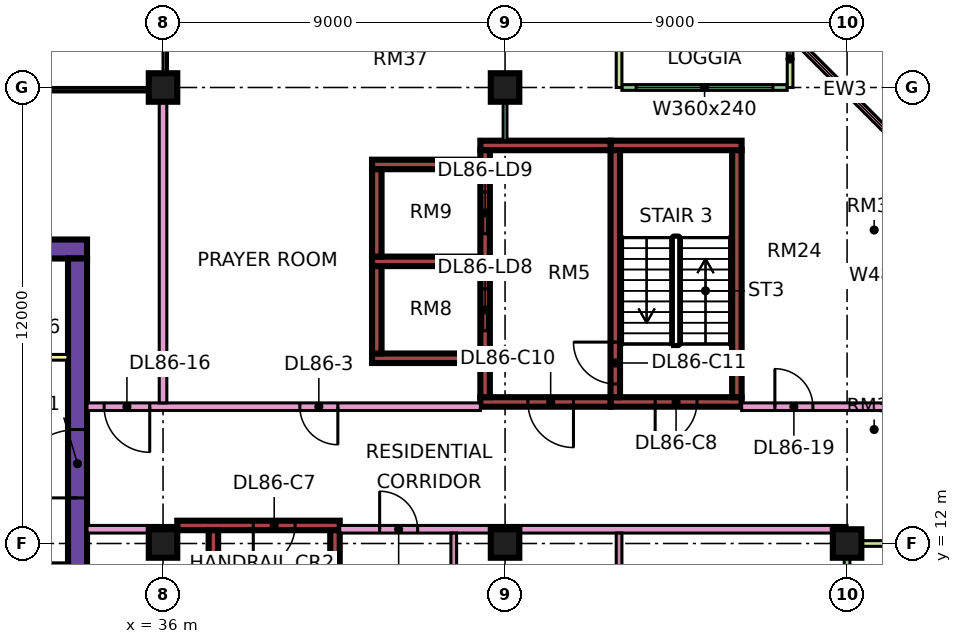
"""IFC4 building model, lengths in metres.
Left out: names, types, materials, properties, quantities, classifications, styles, units other than length and angle.
Written with IfcOpenShell. Run it as: python <this file> out.ifc"""

import sys

from ifc_helpers import new_model, si_unit, direction, frame, frame_2d, origin, origin_2d, place, context, subcontext, project, spatial, rectangle, extrude, element, fill, save


model = new_model("IFC4")
c1 = context("Model", 3, precision=1e-05, world=origin(), true_north=direction((0.0, 1.0)))
c2 = subcontext(c1, "Body", "Model", "MODEL_VIEW")
j1 = project(units=[si_unit("LENGTHUNIT", "METRE"), si_unit("PLANEANGLEUNIT", "RADIAN")], contexts=[c1])
p1 = place(None, origin())
s1 = spatial("IfcSite", under=j1, at=p1, CompositionType="ELEMENT")
p2 = place(p1, origin())
s2 = spatial("IfcBuilding", under=s1, at=p2, CompositionType="ELEMENT")
p3 = place(p2, frame((0.0, 0.0, 368.9)))
s3 = spatial("IfcBuildingStorey", under=s2, at=p3, CompositionType="ELEMENT", Elevation=368.9)
for number, where, z_axis, x_axis in (
    (1, (36.0, 12.0, 0.0), (0.0, 0.0, 1.0), (1.0, 0.0, 0.0)),
    (2, (36.0, 24.0, 0.0), (0.0, 0.0, 1.0), (1.0, 0.0, 0.0)),
    (3, (45.0, 12.0, 0.0), (0.0, 0.0, 1.0), (1.0, 0.0, 0.0)),
    (4, (45.0, 24.0, 0.0), (0.0, 0.0, 1.0), (1.0, 0.0, 0.0)),
    (5, (54.0, 12.0, 0.0), (0.0, 0.0, 1.0), (1.0, 0.0, 0.0)),
):
    element("IfcColumn", number, at=place(p3, frame(where, z_axis=z_axis, x_axis=x_axis)), inside=s3, PredefinedType="COLUMN", context=c2, shape_type="SweptSolid", body=[
        extrude(rectangle(XDim=0.75, YDim=0.75, at=origin_2d()), origin(), (0.0, 0.0, 1.0), 3.75),
    ])
p4 = place(p3, frame((9.0, 19.75, 0.0), z_axis=(0.0, 0.0, 1.0), x_axis=(1.0, 0.0, 0.0)))
e6 = element("IfcWall", 6, at=p4, inside=s3, PredefinedType="SHEAR", context=c2, shape_type="SweptSolid", body=[
    extrude(rectangle(XDim=25.0, YDim=0.5, at=frame_2d((12.5, 0.0))), origin(), (0.0, 0.0, 1.0), 3.75),
])
p5 = place(p4, frame((19.1, 0.0, 0.0)))
e7 = element("IfcOpeningElement", 7, at=p5, cuts=e6, PredefinedType="OPENING", context=c2, shape_type="SweptSolid", body=[
    extrude(rectangle(XDim=1.8, YDim=2.4, at=frame_2d((0.9, 1.2))), frame((0.0, 0.26, 0.0), z_axis=(0.0, -1.0, 0.0), x_axis=(1.0, 0.0, 0.0)), (0.0, 0.0, 1.0), 0.52),
])
p6 = place(p3, frame((33.75, 7.5, 0.0), z_axis=(0.0, 0.0, 1.0), x_axis=(0.0, 1.0, 0.0)))
e8 = element("IfcWall", 8, at=p6, inside=s3, PredefinedType="SHEAR", context=c2, shape_type="SweptSolid", body=[
    extrude(rectangle(XDim=12.0, YDim=0.5, at=frame_2d((6.0, 0.0))), origin(), (0.0, 0.0, 1.0), 3.75),
])
p7 = place(p6, frame((5.7, 0.0, 0.0)))
e9 = element("IfcOpeningElement", 9, at=p7, cuts=e8, PredefinedType="OPENING", context=c2, shape_type="SweptSolid", body=[
    extrude(rectangle(XDim=1.8, YDim=2.4, at=frame_2d((0.9, 1.2))), frame((0.0, 0.26, 0.0), z_axis=(0.0, -1.0, 0.0), x_axis=(1.0, 0.0, 0.0)), (0.0, 0.0, 1.0), 0.52),
])
p8 = place(p3, frame((36.375, 12.475, 0.0), z_axis=(0.0, 0.0, 1.0), x_axis=(1.0, 0.0, 0.0)))
e10 = element("IfcWall", 10, at=p8, inside=s3, PredefinedType="SHEAR", context=c2, shape_type="SweptSolid", body=[
    extrude(rectangle(XDim=4.275, YDim=0.25, at=frame_2d((2.137, 0.0))), origin(), (0.0, 0.0, 1.0), 3.75),
])
p9 = place(p8, frame((2.0, 0.0, 0.0)))
e11 = element("IfcOpeningElement", 11, at=p9, cuts=e10, PredefinedType="OPENING", context=c2, shape_type="SweptSolid", body=[
    extrude(rectangle(XDim=1.1, YDim=2.2, at=frame_2d((0.55, 1.1))), frame((0.0, 0.135, 0.0), z_axis=(0.0, -1.0, 0.0), x_axis=(1.0, 0.0, 0.0)), (0.0, 0.0, 1.0), 0.27),
])
for number, where, z_axis, x_axis in (
    (12, (37.325, 5.85, 0.0), (0.0, 0.0, 1.0), (0.0, 1.0, 0.0)),
    (13, (40.525, 5.85, 0.0), (0.0, 0.0, 1.0), (0.0, 1.0, 0.0)),
):
    element("IfcWall", number, at=place(p3, frame(where, z_axis=z_axis, x_axis=x_axis)), inside=s3, PredefinedType="SHEAR", context=c2, shape_type="SweptSolid", body=[
        extrude(rectangle(XDim=6.5, YDim=0.25, at=frame_2d((3.25, 0.0))), origin(), (0.0, 0.0, 1.0), 3.75),
    ])
p10 = place(p3, frame((47.775, 15.725, 0.0), z_axis=(0.0, 0.0, 1.0), x_axis=(1.0, 0.0, 0.0)))
e14 = element("IfcWall", 14, at=p10, inside=s3, PredefinedType="SHEAR", context=c2, shape_type="SweptSolid", body=[
    extrude(rectangle(XDim=3.45, YDim=0.25, at=frame_2d((1.725, 0.0))), origin(), (0.0, 0.0, 1.0), 3.75),
])
p11 = place(p10, frame((1.175, 0.0, 0.0)))
e15 = element("IfcOpeningElement", 15, at=p11, cuts=e14, PredefinedType="OPENING", context=c2, shape_type="SweptSolid", body=[
    extrude(rectangle(XDim=1.1, YDim=2.2, at=frame_2d((0.55, 1.1))), frame((0.0, 0.135, 0.0), z_axis=(0.0, -1.0, 0.0), x_axis=(1.0, 0.0, 0.0)), (0.0, 0.0, 1.0), 0.27),
])
p12 = place(p3, frame((47.775, 22.475, 0.0), z_axis=(0.0, 0.0, 1.0), x_axis=(1.0, 0.0, 0.0)))
e16 = element("IfcWall", 16, at=p12, inside=s3, PredefinedType="SHEAR", context=c2, shape_type="SweptSolid", body=[
    extrude(rectangle(XDim=3.45, YDim=0.25, at=frame_2d((1.725, 0.0))), origin(), (0.0, 0.0, 1.0), 3.75),
])
p13 = place(p3, frame((47.9, 15.85, 0.0), z_axis=(0.0, 0.0, 1.0), x_axis=(0.0, 1.0, 0.0)))
e17 = element("IfcWall", 17, at=p13, inside=s3, PredefinedType="SHEAR", context=c2, shape_type="SweptSolid", body=[
    extrude(rectangle(XDim=6.5, YDim=0.25, at=frame_2d((3.25, 0.0))), origin(), (0.0, 0.0, 1.0), 3.75),
])
p14 = place(p13, frame((0.35, 0.0, 0.0)))
e18 = element("IfcOpeningElement", 18, at=p14, cuts=e17, PredefinedType="OPENING", context=c2, shape_type="SweptSolid", body=[
    extrude(rectangle(XDim=1.1, YDim=2.2, at=frame_2d((0.55, 1.1))), frame((0.0, 0.135, 0.0), z_axis=(0.0, -1.0, 0.0), x_axis=(1.0, 0.0, 0.0)), (0.0, 0.0, 1.0), 0.27),
])
p15 = place(p3, frame((51.1, 15.85, 0.0), z_axis=(0.0, 0.0, 1.0), x_axis=(0.0, 1.0, 0.0)))
e19 = element("IfcWall", 19, at=p15, inside=s3, PredefinedType="SHEAR", context=c2, shape_type="SweptSolid", body=[
    extrude(rectangle(XDim=6.5, YDim=0.25, at=frame_2d((3.25, 0.0))), origin(), (0.0, 0.0, 1.0), 3.75),
])
p16 = place(p3, frame((44.35, 15.725, 0.0), z_axis=(0.0, 0.0, 1.0), x_axis=(1.0, 0.0, 0.0)))
e20 = element("IfcWall", 20, at=p16, inside=s3, PredefinedType="SHEAR", context=c2, shape_type="SweptSolid", body=[
    extrude(rectangle(XDim=3.425, YDim=0.25, at=frame_2d((1.712, 0.0))), origin(), (0.0, 0.0, 1.0), 3.75),
])
p17 = place(p16, frame((1.25, 0.0, 0.0)))
e21 = element("IfcOpeningElement", 21, at=p17, cuts=e20, PredefinedType="OPENING", context=c2, shape_type="SweptSolid", body=[
    extrude(rectangle(XDim=1.2, YDim=2.2, at=frame_2d((0.6, 1.1))), frame((0.0, 0.135, 0.0), z_axis=(0.0, -1.0, 0.0), x_axis=(1.0, 0.0, 0.0)), (0.0, 0.0, 1.0), 0.27),
])
p18 = place(p3, frame((44.35, 22.475, 0.0), z_axis=(0.0, 0.0, 1.0), x_axis=(1.0, 0.0, 0.0)))
e22 = element("IfcWall", 22, at=p18, inside=s3, PredefinedType="SHEAR", context=c2, shape_type="SweptSolid", body=[
    extrude(rectangle(XDim=3.425, YDim=0.25, at=frame_2d((1.712, 0.0))), origin(), (0.0, 0.0, 1.0), 3.75),
])
p19 = place(p3, frame((44.475, 15.85, 0.0), z_axis=(0.0, 0.0, 1.0), x_axis=(0.0, 1.0, 0.0)))
e23 = element("IfcWall", 23, at=p19, inside=s3, PredefinedType="SHEAR", context=c2, shape_type="SweptSolid", body=[
    extrude(rectangle(XDim=6.5, YDim=0.25, at=frame_2d((3.25, 0.0))), origin(), (0.0, 0.0, 1.0), 3.75),
])
p20 = place(p19, frame((1.75, 0.0, 0.0)))
e24 = element("IfcOpeningElement", 24, at=p20, cuts=e23, PredefinedType="OPENING", context=c2, shape_type="SweptSolid", body=[
    extrude(rectangle(XDim=1.1, YDim=2.2, at=frame_2d((0.55, 1.1))), frame((0.0, 0.135, 0.0), z_axis=(0.0, -1.0, 0.0), x_axis=(1.0, 0.0, 0.0)), (0.0, 0.0, 1.0), 0.27),
])
p21 = place(p19, frame((4.3, 0.0, 0.0)))
e25 = element("IfcOpeningElement", 25, at=p21, cuts=e23, PredefinedType="OPENING", context=c2, shape_type="SweptSolid", body=[
    extrude(rectangle(XDim=1.1, YDim=2.2, at=frame_2d((0.55, 1.1))), frame((0.0, 0.135, 0.0), z_axis=(0.0, -1.0, 0.0), x_axis=(1.0, 0.0, 0.0)), (0.0, 0.0, 1.0), 0.27),
])
for number, where, z_axis, x_axis in (
    (26, (41.5, 16.875, 0.0), (0.0, 0.0, 1.0), (1.0, 0.0, 0.0)),
    (27, (41.5, 19.425, 0.0), (0.0, 0.0, 1.0), (1.0, 0.0, 0.0)),
    (28, (41.5, 21.975, 0.0), (0.0, 0.0, 1.0), (1.0, 0.0, 0.0)),
):
    element("IfcWall", number, at=place(p3, frame(where, z_axis=z_axis, x_axis=x_axis)), inside=s3, PredefinedType="SHEAR", context=c2, shape_type="SweptSolid", body=[
        extrude(rectangle(XDim=2.85, YDim=0.25, at=frame_2d((1.425, 0.0))), origin(), (0.0, 0.0, 1.0), 3.75),
    ])
for number, where, z_axis, x_axis in (
    (29, (41.625, 17.0, 0.0), (0.0, 0.0, 1.0), (0.0, 1.0, 0.0)),
    (30, (41.625, 19.55, 0.0), (0.0, 0.0, 1.0), (0.0, 1.0, 0.0)),
):
    element("IfcWall", number, at=place(p3, frame(where, z_axis=z_axis, x_axis=x_axis)), inside=s3, PredefinedType="SHEAR", context=c2, shape_type="SweptSolid", body=[
        extrude(rectangle(XDim=2.3, YDim=0.25, at=frame_2d((1.15, 0.0))), origin(), (0.0, 0.0, 1.0), 3.75),
    ])
p22 = place(p3, frame((52.425, 24.0, 0.0), z_axis=(0.0, 0.0, 1.0), x_axis=(-1.0, 0.0, 0.0)))
e31 = element("IfcWall", 31, at=p22, inside=s3, PredefinedType="SOLIDWALL", context=c2, shape_type="SweptSolid", body=[
    extrude(rectangle(XDim=4.35, YDim=0.15, at=frame_2d((2.175, 0.0))), origin(), (0.0, 0.0, 1.0), 3.35),
])
p23 = place(p22, frame((0.375, 0.0, 0.45)))
e32 = element("IfcOpeningElement", 32, at=p23, cuts=e31, PredefinedType="OPENING", context=c2, shape_type="SweptSolid", body=[
    extrude(rectangle(XDim=3.6, YDim=2.4, at=frame_2d((1.8, 1.2))), frame((0.0, 0.085, 0.0), z_axis=(0.0, -1.0, 0.0), x_axis=(1.0, 0.0, 0.0)), (0.0, 0.0, 1.0), 0.17),
])
for number, where, z_axis, x_axis in (
    (33, (52.5, 25.5, 0.0), (0.0, 0.0, 1.0), (0.0, -1.0, 0.0)),
    (34, (48.0, 25.5, 0.0), (0.0, 0.0, 1.0), (0.0, -1.0, 0.0)),
):
    element("IfcWall", number, at=place(p3, frame(where, z_axis=z_axis, x_axis=x_axis)), inside=s3, PredefinedType="SOLIDWALL", context=c2, shape_type="SweptSolid", body=[
        extrude(rectangle(XDim=1.5, YDim=0.15, at=frame_2d((0.75, 0.0))), origin(), (0.0, 0.0, 1.0), 3.35),
    ])
p24 = place(p3, frame((54.0, 1.575, 0.0), z_axis=(0.0, 0.0, 1.0), x_axis=(0.0, 1.0, 0.0)))
e35 = element("IfcWall", 35, at=p24, inside=s3, PredefinedType="SOLIDWALL", context=c2, shape_type="SweptSolid", body=[
    extrude(rectangle(XDim=10.35, YDim=0.15, at=frame_2d((5.175, 0.0))), origin(), (0.0, 0.0, 1.0), 3.35),
])
p25 = place(p24, frame((0.663, 0.0, 0.0)))
e36 = element("IfcOpeningElement", 36, at=p25, cuts=e35, PredefinedType="OPENING", context=c2, shape_type="SweptSolid", body=[
    extrude(rectangle(XDim=1.8, YDim=2.4, at=frame_2d((0.9, 1.2))), frame((0.0, 0.085, 0.0), z_axis=(0.0, -1.0, 0.0), x_axis=(1.0, 0.0, 0.0)), (0.0, 0.0, 1.0), 0.17),
])
p26 = place(p24, frame((5.637, 0.0, 0.45)))
e37 = element("IfcOpeningElement", 37, at=p26, cuts=e35, PredefinedType="OPENING", context=c2, shape_type="SweptSolid", body=[
    extrude(rectangle(XDim=3.0, YDim=2.4, at=frame_2d((1.5, 1.2))), frame((0.0, 0.085, 0.0), z_axis=(0.0, -1.0, 0.0), x_axis=(1.0, 0.0, 0.0)), (0.0, 0.0, 1.0), 0.17),
])
p27 = place(p3, frame((55.5, 12.0, 0.0), z_axis=(0.0, 0.0, 1.0), x_axis=(-1.0, 0.0, 0.0)))
e38 = element("IfcWall", 38, at=p27, inside=s3, PredefinedType="SOLIDWALL", context=c2, shape_type="SweptSolid", body=[
    extrude(rectangle(XDim=1.5, YDim=0.15, at=frame_2d((0.75, 0.0))), origin(), (0.0, 0.0, 1.0), 3.35),
])
p28 = place(p3, frame((55.447, 22.447, 0.0), z_axis=(0.0, 0.0, 1.0), x_axis=(-0.707106781187, 0.707106781187, 0.0)))
e39 = element("IfcWall", 39, at=p28, inside=s3, PredefinedType="SOLIDWALL", context=c2, shape_type="SweptSolid", body=[
    extrude(rectangle(XDim=4.243, YDim=0.15, at=frame_2d((2.121, 0.0))), origin(), (0.0, 0.0, 1.0), 3.35),
])
p29 = place(p28, frame((0.621, 0.0, 0.45)))
e40 = element("IfcOpeningElement", 40, at=p29, cuts=e39, PredefinedType="OPENING", context=c2, shape_type="SweptSolid", body=[
    extrude(rectangle(XDim=3.0, YDim=2.4, at=frame_2d((1.5, 1.2))), frame((0.0, 0.085, 0.0), z_axis=(0.0, -1.0, 0.0), x_axis=(1.0, 0.0, 0.0)), (0.0, 0.0, 1.0), 0.17),
])
p30 = place(p3, frame((31.1, 16.9, 0.0), z_axis=(0.0, 0.0, 1.0), x_axis=(1.0, 0.0, 0.0)))
e41 = element("IfcWall", 41, at=p30, inside=s3, PredefinedType="PARTITIONING", context=c2, shape_type="SweptSolid", body=[
    extrude(rectangle(XDim=2.4, YDim=0.15, at=frame_2d((1.2, 0.0))), origin(), (0.0, 0.0, 1.0), 3.35),
])
p31 = place(p3, frame((34.0, 12.375, 0.0), z_axis=(0.0, 0.0, 1.0), x_axis=(1.0, 0.0, 0.0)))
e42 = element("IfcWall", 42, at=p31, inside=s3, PredefinedType="PARTITIONING", context=c2, shape_type="SweptSolid", body=[
    extrude(rectangle(XDim=2.376, YDim=0.2, at=frame_2d((1.188, 0.0))), origin(), (0.0, 0.0, 1.0), 3.35),
])
p32 = place(p3, frame((34.0, 15.6, 0.0), z_axis=(0.0, 0.0, 1.0), x_axis=(1.0, 0.0, 0.0)))
e43 = element("IfcWall", 43, at=p32, inside=s3, PredefinedType="PARTITIONING", context=c2, shape_type="SweptSolid", body=[
    extrude(rectangle(XDim=10.35, YDim=0.2, at=frame_2d((5.175, 0.0))), origin(), (0.0, 0.0, 1.0), 3.35),
])
p33 = place(p32, frame((5.6, 0.0, 0.0)))
e44 = element("IfcOpeningElement", 44, at=p33, cuts=e43, PredefinedType="OPENING", context=c2, shape_type="SweptSolid", body=[
    extrude(rectangle(XDim=1.0, YDim=2.1, at=frame_2d((0.5, 1.05))), frame((0.0, 0.11, 0.0), z_axis=(0.0, -1.0, 0.0), x_axis=(1.0, 0.0, 0.0)), (0.0, 0.0, 1.0), 0.22),
])
p34 = place(p32, frame((0.45, 0.0, 0.0)))
e45 = element("IfcOpeningElement", 45, at=p34, cuts=e43, PredefinedType="OPENING", context=c2, shape_type="SweptSolid", body=[
    extrude(rectangle(XDim=1.2, YDim=2.1, at=frame_2d((0.6, 1.05))), frame((0.0, 0.11, 0.0), z_axis=(0.0, -1.0, 0.0), x_axis=(1.0, 0.0, 0.0)), (0.0, 0.0, 1.0), 0.22),
])
p35 = place(p3, frame((36.0, 15.7, 0.0), z_axis=(0.0, 0.0, 1.0), x_axis=(0.0, 1.0, 0.0)))
e46 = element("IfcWall", 46, at=p35, inside=s3, PredefinedType="PARTITIONING", context=c2, shape_type="SweptSolid", body=[
    extrude(rectangle(XDim=8.3, YDim=0.2, at=frame_2d((4.15, 0.0))), origin(), (0.0, 0.0, 1.0), 3.35),
])
p36 = place(p3, frame((40.65, 12.375, 0.0), z_axis=(0.0, 0.0, 1.0), x_axis=(1.0, 0.0, 0.0)))
e47 = element("IfcWall", 47, at=p36, inside=s3, PredefinedType="PARTITIONING", context=c2, shape_type="SweptSolid", body=[
    extrude(rectangle(XDim=13.35, YDim=0.2, at=frame_2d((6.675, 0.0))), origin(), (0.0, 0.0, 1.0), 3.35),
])
p37 = place(p36, frame((1.05, 0.0, 0.0)))
e48 = element("IfcOpeningElement", 48, at=p37, cuts=e47, PredefinedType="OPENING", context=c2, shape_type="SweptSolid", body=[
    extrude(rectangle(XDim=1.0, YDim=2.1, at=frame_2d((0.5, 1.05))), frame((0.0, 0.11, 0.0), z_axis=(0.0, -1.0, 0.0), x_axis=(1.0, 0.0, 0.0)), (0.0, 0.0, 1.0), 0.22),
])
p38 = place(p3, frame((43.65, 5.975, 0.0), z_axis=(0.0, 0.0, 1.0), x_axis=(0.0, 1.0, 0.0)))
e49 = element("IfcWall", 49, at=p38, inside=s3, PredefinedType="PARTITIONING", context=c2, shape_type="SweptSolid", body=[
    extrude(rectangle(XDim=6.3, YDim=0.15, at=frame_2d((3.15, 0.0))), origin(), (0.0, 0.0, 1.0), 3.35),
])
p39 = place(p38, frame((4.275, 0.0, 0.0)))
e50 = element("IfcOpeningElement", 50, at=p39, cuts=e49, PredefinedType="OPENING", context=c2, shape_type="SweptSolid", body=[
    extrude(rectangle(XDim=0.9, YDim=2.1, at=frame_2d((0.45, 1.05))), frame((0.0, 0.085, 0.0), z_axis=(0.0, -1.0, 0.0), x_axis=(1.0, 0.0, 0.0)), (0.0, 0.0, 1.0), 0.17),
])
p40 = place(p3, frame((45.0, 22.6, 0.0), z_axis=(0.0, 0.0, 1.0), x_axis=(0.0, 1.0, 0.0)))
e51 = element("IfcWall", 51, at=p40, inside=s3, PredefinedType="PARTITIONING", context=c2, shape_type="SweptSolid", body=[
    extrude(rectangle(XDim=1.4, YDim=0.1, at=frame_2d((0.7, 0.0))), origin(), (0.0, 0.0, 1.0), 3.35),
])
p41 = place(p3, frame((48.0, 5.975, 0.0), z_axis=(0.0, 0.0, 1.0), x_axis=(0.0, 1.0, 0.0)))
e52 = element("IfcWall", 52, at=p41, inside=s3, PredefinedType="PARTITIONING", context=c2, shape_type="SweptSolid", body=[
    extrude(rectangle(XDim=6.3, YDim=0.15, at=frame_2d((3.15, 0.0))), origin(), (0.0, 0.0, 1.0), 3.35),
])
p42 = place(p3, frame((51.225, 15.6, 0.0), z_axis=(0.0, 0.0, 1.0), x_axis=(1.0, 0.0, 0.0)))
e53 = element("IfcWall", 53, at=p42, inside=s3, PredefinedType="PARTITIONING", context=c2, shape_type="SweptSolid", body=[
    extrude(rectangle(XDim=4.125, YDim=0.2, at=frame_2d((2.062, 0.0))), origin(), (0.0, 0.0, 1.0), 3.35),
])
p43 = place(p42, frame((0.875, 0.0, 0.0)))
e54 = element("IfcOpeningElement", 54, at=p43, cuts=e53, PredefinedType="OPENING", context=c2, shape_type="SweptSolid", body=[
    extrude(rectangle(XDim=1.0, YDim=2.1, at=frame_2d((0.5, 1.05))), frame((0.0, 0.11, 0.0), z_axis=(0.0, -1.0, 0.0), x_axis=(1.0, 0.0, 0.0)), (0.0, 0.0, 1.0), 0.22),
])
p44 = place(p23, origin())
e55 = element("IfcWindow", 55, at=p44, inside=s3, PartitioningType="SINGLE_PANEL", PredefinedType="WINDOW", context=c2, shape_type="SweptSolid", body=[
    extrude(rectangle(XDim=3.6, YDim=2.4, at=frame_2d((1.8, 1.2))), frame((0.0, 0.03, 0.0), z_axis=(0.0, -1.0, 0.0), x_axis=(1.0, 0.0, 0.0)), (0.0, 0.0, 1.0), 0.06),
])
fill(e32, e55)
p45 = place(p29, origin())
e56 = element("IfcWindow", 56, at=p45, inside=s3, PartitioningType="SINGLE_PANEL", PredefinedType="WINDOW", context=c2, shape_type="SweptSolid", body=[
    extrude(rectangle(XDim=3.0, YDim=2.4, at=frame_2d((1.5, 1.2))), frame((0.0, 0.03, 0.0), z_axis=(0.0, -1.0, 0.0), x_axis=(1.0, 0.0, 0.0)), (0.0, 0.0, 1.0), 0.06),
])
fill(e40, e56)
p46 = place(p7, origin())
e57 = element("IfcDoor", 57, at=p46, inside=s3, OperationType="DOUBLE_DOOR_SINGLE_SWING", PredefinedType="DOOR", context=c2, shape_type="SweptSolid", body=[
    extrude(rectangle(XDim=1.8, YDim=2.4, at=frame_2d((0.9, 1.2))), frame((0.0, 0.025, 0.0), z_axis=(0.0, -1.0, 0.0), x_axis=(1.0, 0.0, 0.0)), (0.0, 0.0, 1.0), 0.05),
])
fill(e9, e57)
p47 = place(p9, frame((1.1, 0.0, 0.0), z_axis=(0.0, 0.0, 1.0), x_axis=(-1.0, 0.0, 0.0)))
e58 = element("IfcDoor", 58, at=p47, inside=s3, OperationType="SINGLE_SWING_LEFT", PredefinedType="DOOR", context=c2, shape_type="SweptSolid", body=[
    extrude(rectangle(XDim=1.1, YDim=2.2, at=frame_2d((0.55, 1.1))), frame((0.0, 0.025, 0.0), z_axis=(0.0, -1.0, 0.0), x_axis=(1.0, 0.0, 0.0)), (0.0, 0.0, 1.0), 0.05),
])
fill(e11, e58)
p48 = place(p11, frame((1.1, 0.0, 0.0), z_axis=(0.0, 0.0, 1.0), x_axis=(-1.0, 0.0, 0.0)))
e59 = element("IfcDoor", 59, at=p48, inside=s3, OperationType="SINGLE_SWING_LEFT", PredefinedType="DOOR", context=c2, shape_type="SweptSolid", body=[
    extrude(rectangle(XDim=1.1, YDim=2.2, at=frame_2d((0.55, 1.1))), frame((0.0, 0.025, 0.0), z_axis=(0.0, -1.0, 0.0), x_axis=(1.0, 0.0, 0.0)), (0.0, 0.0, 1.0), 0.05),
])
fill(e15, e59)
p49 = place(p17, origin())
e60 = element("IfcDoor", 60, at=p49, inside=s3, OperationType="SINGLE_SWING_RIGHT", PredefinedType="DOOR", context=c2, shape_type="SweptSolid", body=[
    extrude(rectangle(XDim=1.2, YDim=2.2, at=frame_2d((0.6, 1.1))), frame((0.0, 0.025, 0.0), z_axis=(0.0, -1.0, 0.0), x_axis=(1.0, 0.0, 0.0)), (0.0, 0.0, 1.0), 0.05),
])
fill(e21, e60)
p50 = place(p14, frame((1.1, 0.0, 0.0), z_axis=(0.0, 0.0, 1.0), x_axis=(-1.0, 0.0, 0.0)))
e61 = element("IfcDoor", 61, at=p50, inside=s3, OperationType="SINGLE_SWING_RIGHT", PredefinedType="DOOR", context=c2, shape_type="SweptSolid", body=[
    extrude(rectangle(XDim=1.1, YDim=2.2, at=frame_2d((0.55, 1.1))), frame((0.0, 0.025, 0.0), z_axis=(0.0, -1.0, 0.0), x_axis=(1.0, 0.0, 0.0)), (0.0, 0.0, 1.0), 0.05),
])
fill(e18, e61)
p51 = place(p20, origin())
e62 = element("IfcDoor", 62, at=p51, inside=s3, OperationType="DOUBLE_DOOR_SLIDING", PredefinedType="DOOR", context=c2, shape_type="SweptSolid", body=[
    extrude(rectangle(XDim=1.1, YDim=2.2, at=frame_2d((0.55, 1.1))), frame((0.0, 0.025, 0.0), z_axis=(0.0, -1.0, 0.0), x_axis=(1.0, 0.0, 0.0)), (0.0, 0.0, 1.0), 0.05),
])
fill(e24, e62)
p52 = place(p21, origin())
e63 = element("IfcDoor", 63, at=p52, inside=s3, OperationType="DOUBLE_DOOR_SLIDING", PredefinedType="DOOR", context=c2, shape_type="SweptSolid", body=[
    extrude(rectangle(XDim=1.1, YDim=2.2, at=frame_2d((0.55, 1.1))), frame((0.0, 0.025, 0.0), z_axis=(0.0, -1.0, 0.0), x_axis=(1.0, 0.0, 0.0)), (0.0, 0.0, 1.0), 0.05),
])
fill(e25, e63)
p53 = place(p33, origin())
e64 = element("IfcDoor", 64, at=p53, inside=s3, OperationType="SINGLE_SWING_RIGHT", PredefinedType="DOOR", context=c2, shape_type="SweptSolid", body=[
    extrude(rectangle(XDim=1.0, YDim=2.1, at=frame_2d((0.5, 1.05))), frame((0.0, 0.025, 0.0), z_axis=(0.0, -1.0, 0.0), x_axis=(1.0, 0.0, 0.0)), (0.0, 0.0, 1.0), 0.05),
])
fill(e44, e64)
p54 = place(p34, origin())
e65 = element("IfcDoor", 65, at=p54, inside=s3, OperationType="SINGLE_SWING_RIGHT", PredefinedType="DOOR", context=c2, shape_type="SweptSolid", body=[
    extrude(rectangle(XDim=1.2, YDim=2.1, at=frame_2d((0.6, 1.05))), frame((0.0, 0.025, 0.0), z_axis=(0.0, -1.0, 0.0), x_axis=(1.0, 0.0, 0.0)), (0.0, 0.0, 1.0), 0.05),
])
fill(e45, e65)
p55 = place(p43, origin())
e66 = element("IfcDoor", 66, at=p55, inside=s3, OperationType="SINGLE_SWING_LEFT", PredefinedType="DOOR", context=c2, shape_type="SweptSolid", body=[
    extrude(rectangle(XDim=1.0, YDim=2.1, at=frame_2d((0.5, 1.05))), frame((0.0, 0.025, 0.0), z_axis=(0.0, -1.0, 0.0), x_axis=(1.0, 0.0, 0.0)), (0.0, 0.0, 1.0), 0.05),
])
fill(e54, e66)
p56 = place(p37, origin())
e67 = element("IfcDoor", 67, at=p56, inside=s3, OperationType="SINGLE_SWING_LEFT", PredefinedType="DOOR", context=c2, shape_type="SweptSolid", body=[
    extrude(rectangle(XDim=1.0, YDim=2.1, at=frame_2d((0.5, 1.05))), frame((0.0, 0.025, 0.0), z_axis=(0.0, -1.0, 0.0), x_axis=(1.0, 0.0, 0.0)), (0.0, 0.0, 1.0), 0.05),
])
fill(e48, e67)
save(model, sys.argv[1])
